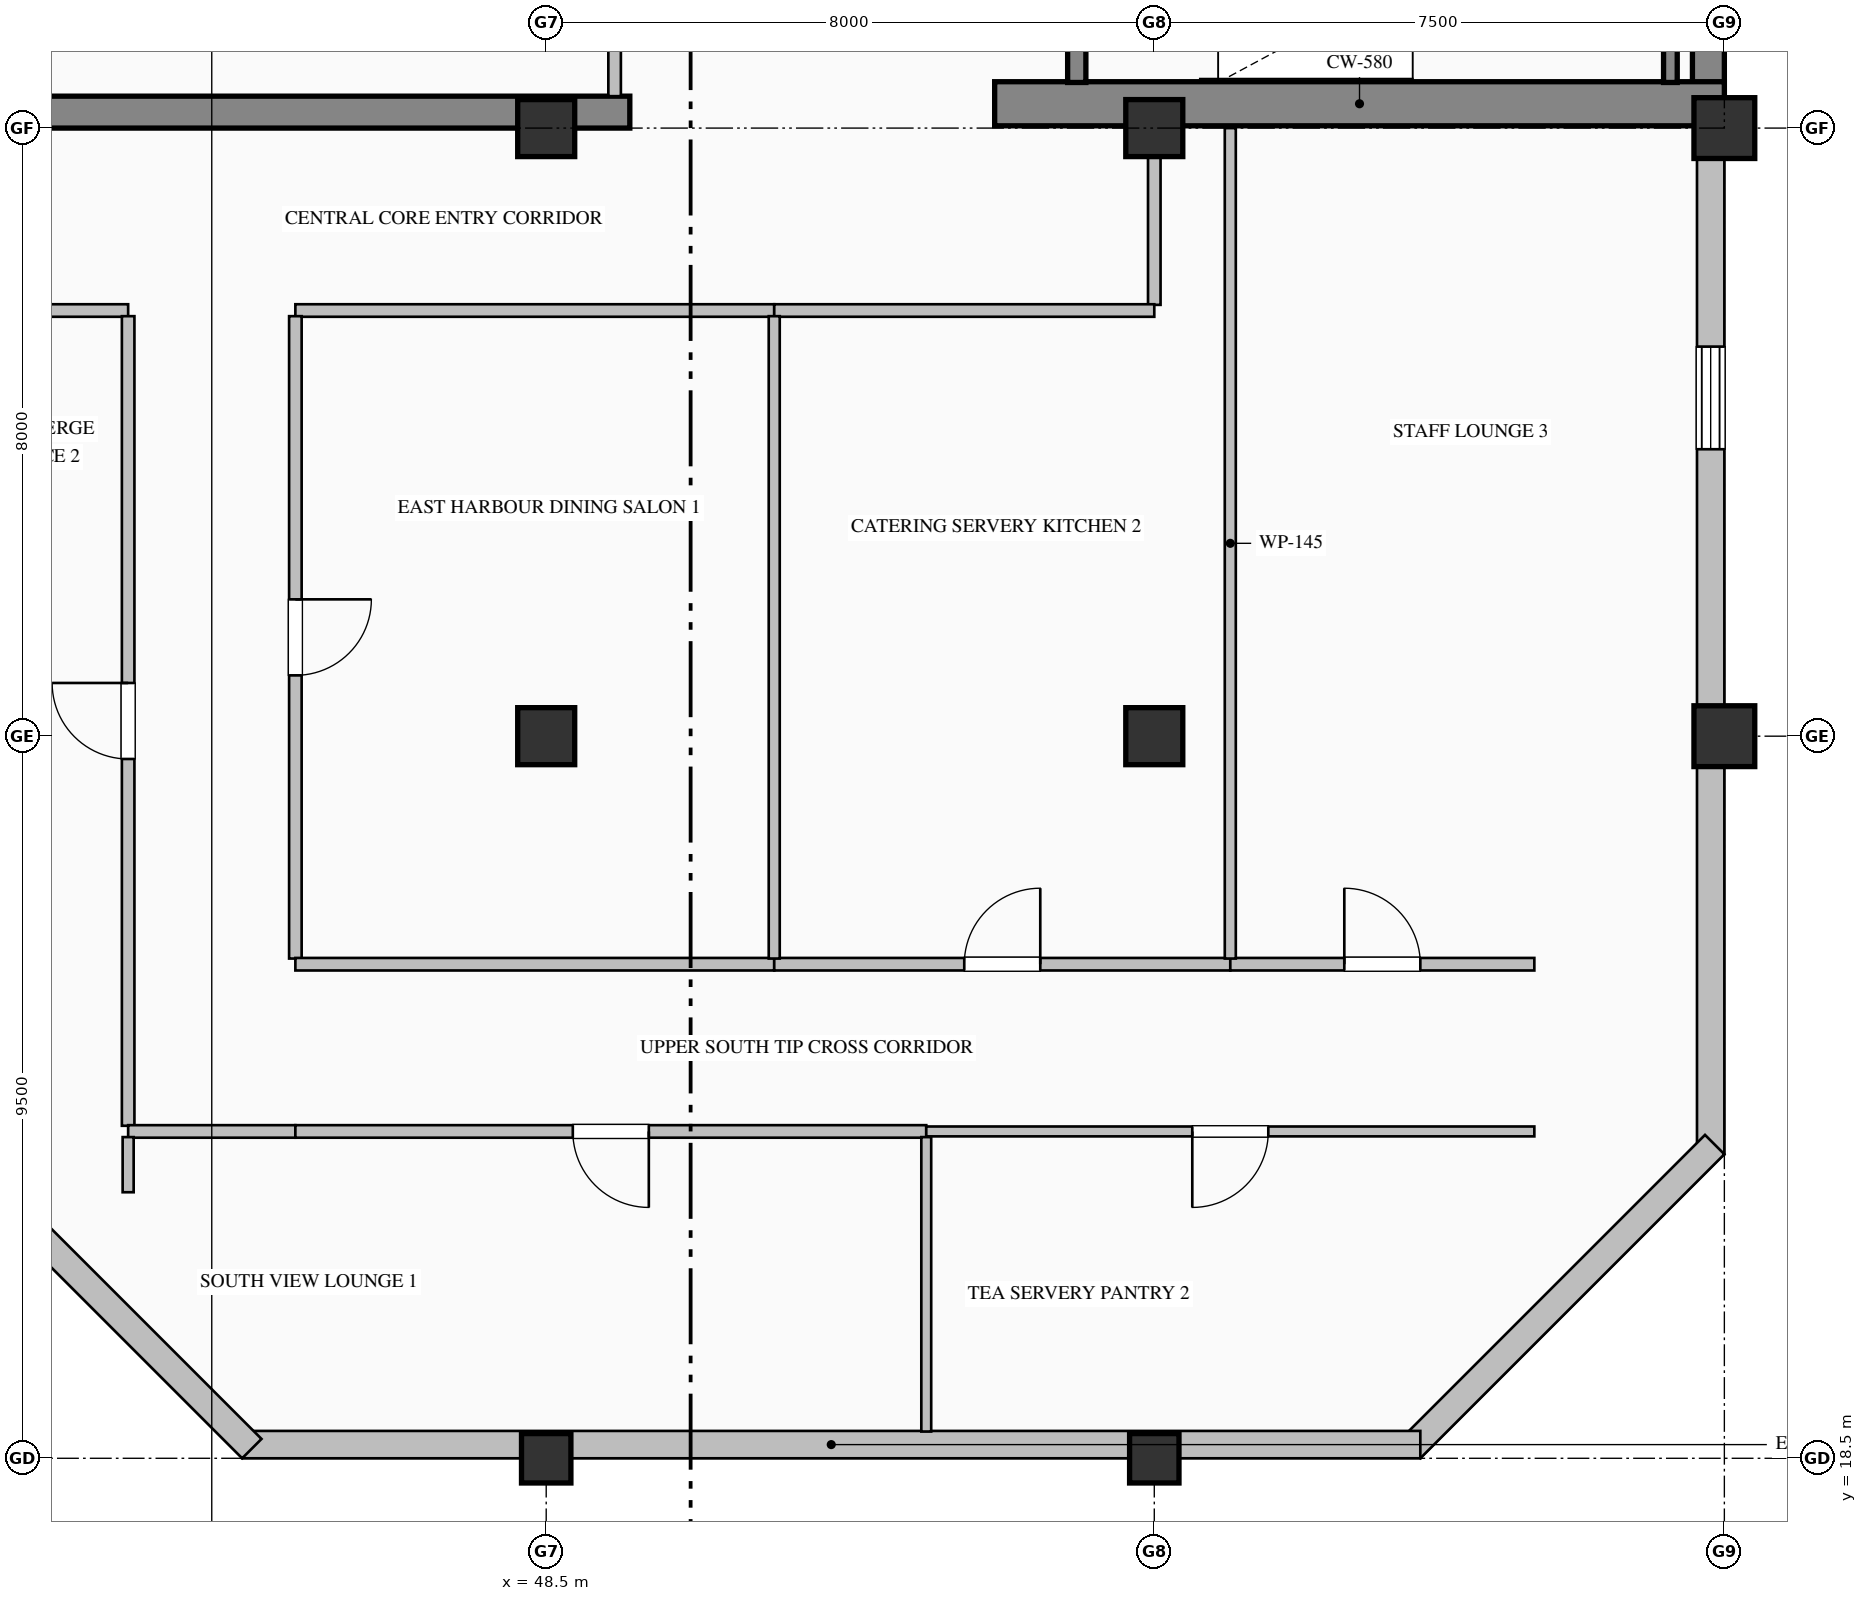
"""IFC4 building model, lengths in metres.
Left out: names, types, materials, properties, quantities, classifications, styles, units other than length and angle.
Written with IfcOpenShell. Run it as: python <this file> out.ifc"""

import sys

from ifc_helpers import new_model, si_unit, direction, frame, frame_2d, origin, origin_2d, place, context, subcontext, project, spatial, rectangle, hollow_rectangle, extrude, element, fill, save


model = new_model("IFC4")
c1 = context("Model", 3, precision=1e-05, world=origin(), true_north=direction((0.0, 1.0)))
c2 = subcontext(c1, "Body", "Model", "MODEL_VIEW")
j1 = project(units=[si_unit("LENGTHUNIT", "METRE"), si_unit("PLANEANGLEUNIT", "RADIAN")], contexts=[c1])
p1 = place(None, origin())
s1 = spatial("IfcSite", under=j1, at=p1, CompositionType="ELEMENT")
p2 = place(p1, origin())
s2 = spatial("IfcBuilding", under=s1, at=p2, CompositionType="ELEMENT")
p3 = place(p2, frame((0.0, 0.0, 331.2)))
s3 = spatial("IfcBuildingStorey", under=s2, at=p3, CompositionType="ELEMENT", Elevation=331.2)
p4 = place(p3, frame((63.79, 36.32, 0.0), z_axis=(0.0, 0.0, 1.0), x_axis=(0.0, 1.0, 0.0)))
e1 = element("IfcWall", 1, at=p4, inside=s3, PredefinedType="SHEAR", context=c2, shape_type="SweptSolid", body=[
    extrude(rectangle(XDim=15.26, YDim=0.42, at=frame_2d((7.63, 0.0))), origin(), (0.0, 0.0, 1.0), 3.785),
])
p5 = place(p3, frame((40.5, 36.21, 0.0), z_axis=(0.0, 0.0, 1.0), x_axis=(1.0, 0.0, 0.0)))
e2 = element("IfcWall", 2, at=p5, inside=s3, PredefinedType="SHEAR", context=c2, shape_type="SweptSolid", body=[
    extrude(rectangle(XDim=9.1, YDim=0.42, at=frame_2d((4.55, 0.0))), origin(), (0.0, 0.0, 1.0), 3.785),
])
p6 = place(p3, frame((54.4, 36.32, 0.0), z_axis=(0.0, 0.0, 1.0), x_axis=(1.0, 0.0, 0.0)))
e3 = element("IfcWall", 3, at=p6, inside=s3, PredefinedType="SHEAR", context=c2, shape_type="SweptSolid", body=[
    extrude(rectangle(XDim=9.6, YDim=0.58, at=frame_2d((4.8, 0.0))), origin(), (0.0, 0.0, 1.0), 4.0),
])
p7 = place(p3, frame((48.5, 18.5, 0.0), z_axis=(0.0, 0.0, 1.0), x_axis=(1.0, 0.0, 0.0)))
e4 = element("IfcColumn", 4, at=p7, inside=s3, PredefinedType="COLUMN", context=c2, shape_type="SweptSolid", body=[
    extrude(hollow_rectangle(XDim=0.65, YDim=0.65, WallThickness=0.028, at=origin_2d()), origin(), (0.0, 0.0, 1.0), 4.0),
])
for number, where, z_axis, x_axis in (
    (5, (48.5, 28.0, 0.0), (0.0, 0.0, 1.0), (1.0, 0.0, 0.0)),
    (6, (48.5, 36.0, 0.0), (0.0, 0.0, 1.0), (1.0, 0.0, 0.0)),
):
    element("IfcColumn", number, at=place(p3, frame(where, z_axis=z_axis, x_axis=x_axis)), inside=s3, PredefinedType="COLUMN", context=c2, shape_type="SweptSolid", body=[
        extrude(rectangle(XDim=0.75, YDim=0.75, at=origin_2d()), origin(), (0.0, 0.0, 1.0), 4.0),
    ])
p8 = place(p3, frame((56.5, 18.5, 0.0), z_axis=(0.0, 0.0, 1.0), x_axis=(1.0, 0.0, 0.0)))
e7 = element("IfcColumn", 7, at=p8, inside=s3, PredefinedType="COLUMN", context=c2, shape_type="SweptSolid", body=[
    extrude(hollow_rectangle(XDim=0.65, YDim=0.65, WallThickness=0.028, at=origin_2d()), origin(), (0.0, 0.0, 1.0), 4.0),
])
for number, where, z_axis, x_axis in (
    (8, (56.5, 28.0, 0.0), (0.0, 0.0, 1.0), (1.0, 0.0, 0.0)),
    (9, (56.5, 36.0, 0.0), (0.0, 0.0, 1.0), (1.0, 0.0, 0.0)),
):
    element("IfcColumn", number, at=place(p3, frame(where, z_axis=z_axis, x_axis=x_axis)), inside=s3, PredefinedType="COLUMN", context=c2, shape_type="SweptSolid", body=[
        extrude(rectangle(XDim=0.75, YDim=0.75, at=origin_2d()), origin(), (0.0, 0.0, 1.0), 4.0),
    ])
for number, where, z_axis, x_axis in (
    (10, (64.0, 28.0, 0.0), (0.0, 0.0, 1.0), (1.0, 0.0, 0.0)),
    (11, (64.0, 36.0, 0.0), (0.0, 0.0, 1.0), (1.0, 0.0, 0.0)),
):
    element("IfcColumn", number, at=place(p3, frame(where, z_axis=z_axis, x_axis=x_axis)), inside=s3, PredefinedType="COLUMN", context=c2, shape_type="SweptSolid", body=[
        extrude(hollow_rectangle(XDim=0.8, YDim=0.8, WallThickness=0.032, at=origin_2d()), origin(), (0.0, 0.0, 1.0), 4.0),
    ])
p9 = place(p3, frame((63.82, 36.05, 0.0), z_axis=(0.0, 0.0, 1.0), x_axis=(0.0, -1.0, 0.0)))
e12 = element("IfcWall", 12, at=p9, inside=s3, PredefinedType="SOLIDWALL", context=c2, shape_type="SweptSolid", body=[
    extrude(rectangle(XDim=13.55, YDim=0.36, at=frame_2d((6.775, 0.0))), origin(), (0.0, 0.0, 1.0), 3.335),
])
p10 = place(p9, frame((2.925, 0.0, 0.9)))
e13 = element("IfcOpeningElement", 13, at=p10, cuts=e12, PredefinedType="OPENING", context=c2, shape_type="SweptSolid", body=[
    extrude(rectangle(XDim=1.35, YDim=1.85, at=frame_2d((0.675, 0.925))), frame((0.0, 0.19, 0.0), z_axis=(0.0, -1.0, 0.0), x_axis=(1.0, 0.0, 0.0)), (0.0, 0.0, 1.0), 0.38),
])
p11 = place(p3, frame((63.873, 22.627, 0.0), z_axis=(0.0, 0.0, 1.0), x_axis=(-0.707106781187, -0.707106781187, 0.0)))
e14 = element("IfcWall", 14, at=p11, inside=s3, PredefinedType="SOLIDWALL", context=c2, shape_type="SweptSolid", body=[
    extrude(rectangle(XDim=5.657, YDim=0.36, at=frame_2d((2.828, 0.0))), origin(), (0.0, 0.0, 1.0), 3.785),
])
p12 = place(p3, frame((60.0, 18.68, 0.0), z_axis=(0.0, 0.0, 1.0), x_axis=(-1.0, 0.0, 0.0)))
e15 = element("IfcWall", 15, at=p12, inside=s3, PredefinedType="SOLIDWALL", context=c2, shape_type="SweptSolid", body=[
    extrude(rectangle(XDim=15.5, YDim=0.36, at=frame_2d((7.75, 0.0))), origin(), (0.0, 0.0, 1.0), 3.335),
])
p13 = place(p3, frame((44.627, 18.627, 0.0), z_axis=(0.0, 0.0, 1.0), x_axis=(-0.707106781187, 0.707106781187, 0.0)))
e16 = element("IfcWall", 16, at=p13, inside=s3, PredefinedType="SOLIDWALL", context=c2, shape_type="SweptSolid", body=[
    extrude(rectangle(XDim=5.657, YDim=0.36, at=frame_2d((2.828, 0.0))), origin(), (0.0, 0.0, 1.0), 3.785),
])
p14 = place(p3, frame((55.48, 39.75, 0.0), z_axis=(0.0, 0.0, 1.0), x_axis=(0.0, -1.0, 0.0)))
e17 = element("IfcWall", 17, at=p14, inside=s3, PredefinedType="SOLIDWALL", context=c2, shape_type="SweptSolid", body=[
    extrude(rectangle(XDim=3.15, YDim=0.24, at=frame_2d((1.575, 0.0))), origin(), (0.0, 0.0, 1.0), 4.0),
])
p15 = place(p14, frame((1.0, 0.0, 0.0)))
e18 = element("IfcOpeningElement", 18, at=p15, cuts=e17, PredefinedType="OPENING", context=c2, shape_type="SweptSolid", body=[
    extrude(rectangle(XDim=1.15, YDim=2.2, at=frame_2d((0.575, 1.1))), frame((0.0, 0.13, 0.0), z_axis=(0.0, -1.0, 0.0), x_axis=(1.0, 0.0, 0.0)), (0.0, 0.0, 1.0), 0.26),
])
p16 = place(p3, frame((63.29, 36.6, 0.0), z_axis=(0.0, 0.0, 1.0), x_axis=(0.0, 1.0, 0.0)))
e19 = element("IfcWall", 19, at=p16, inside=s3, PredefinedType="SOLIDWALL", context=c2, shape_type="SweptSolid", body=[
    extrude(rectangle(XDim=3.15, YDim=0.18, at=frame_2d((1.575, 0.0))), origin(), (0.0, 0.0, 1.0), 4.0),
])
p17 = place(p3, frame((49.4, 36.42, 0.0), z_axis=(0.0, 0.0, 1.0), x_axis=(0.0, 1.0, 0.0)))
e20 = element("IfcWall", 20, at=p17, inside=s3, PredefinedType="PARTITIONING", context=c2, shape_type="SweptSolid", body=[
    extrude(rectangle(XDim=3.115, YDim=0.165, at=frame_2d((1.558, 0.0))), origin(), (0.0, 0.0, 1.0), 3.027),
])
p18 = place(p17, frame((1.058, 0.0, 0.0)))
e21 = element("IfcOpeningElement", 21, at=p18, cuts=e20, PredefinedType="OPENING", context=c2, shape_type="SweptSolid", body=[
    extrude(rectangle(XDim=1.0, YDim=2.15, at=frame_2d((0.5, 1.075))), frame((0.0, 0.093, 0.0), z_axis=(0.0, -1.0, 0.0), x_axis=(1.0, 0.0, 0.0)), (0.0, 0.0, 1.0), 0.185),
])
p19 = place(p3, frame((51.5, 33.6, 0.0), z_axis=(0.0, 0.0, 1.0), x_axis=(-1.0, 0.0, 0.0)))
e22 = element("IfcWall", 22, at=p19, inside=s3, PredefinedType="PARTITIONING", context=c2, shape_type="SweptSolid", body=[
    extrude(rectangle(XDim=6.3, YDim=0.165, at=frame_2d((3.15, 0.0))), origin(), (0.0, 0.0, 1.0), 3.785),
])
p20 = place(p3, frame((56.5, 36.0, 0.0), z_axis=(0.0, 0.0, 1.0), x_axis=(0.0, -1.0, 0.0)))
e23 = element("IfcWall", 23, at=p20, inside=s3, PredefinedType="PARTITIONING", context=c2, shape_type="SweptSolid", body=[
    extrude(rectangle(XDim=2.325, YDim=0.165, at=frame_2d((1.163, 0.0))), origin(), (0.0, 0.0, 1.0), 3.177),
])
p21 = place(p3, frame((56.5, 33.6, 0.0), z_axis=(0.0, 0.0, 1.0), x_axis=(-1.0, 0.0, 0.0)))
e24 = element("IfcWall", 24, at=p21, inside=s3, PredefinedType="PARTITIONING", context=c2, shape_type="SweptSolid", body=[
    extrude(rectangle(XDim=5.0, YDim=0.165, at=frame_2d((2.5, 0.0))), origin(), (0.0, 0.0, 1.0), 3.785),
])
p22 = place(p3, frame((43.0, 33.6, 0.0), z_axis=(0.0, 0.0, 1.0), x_axis=(-1.0, 0.0, 0.0)))
e25 = element("IfcWall", 25, at=p22, inside=s3, PredefinedType="PARTITIONING", context=c2, shape_type="SweptSolid", body=[
    extrude(rectangle(XDim=2.5, YDim=0.165, at=frame_2d((1.25, 0.0))), origin(), (0.0, 0.0, 1.0), 3.785),
])
p23 = place(p3, frame((45.2, 33.525, 0.0), z_axis=(0.0, 0.0, 1.0), x_axis=(0.0, -1.0, 0.0)))
e26 = element("IfcWall", 26, at=p23, inside=s3, PredefinedType="PARTITIONING", context=c2, shape_type="SweptSolid", body=[
    extrude(rectangle(XDim=8.451, YDim=0.165, at=frame_2d((4.226, 0.0))), origin(), (0.0, 0.0, 1.0), 3.785),
])
p24 = place(p23, frame((3.726, 0.0, 0.0)))
e27 = element("IfcOpeningElement", 27, at=p24, cuts=e26, PredefinedType="OPENING", context=c2, shape_type="SweptSolid", body=[
    extrude(rectangle(XDim=1.0, YDim=2.15, at=frame_2d((0.5, 1.075))), frame((0.0, 0.093, 0.0), z_axis=(0.0, -1.0, 0.0), x_axis=(1.0, 0.0, 0.0)), (0.0, 0.0, 1.0), 0.185),
])
p25 = place(p3, frame((43.0, 22.875, 0.0), z_axis=(0.0, 0.0, 1.0), x_axis=(0.0, 1.0, 0.0)))
e28 = element("IfcWall", 28, at=p25, inside=s3, PredefinedType="PARTITIONING", context=c2, shape_type="SweptSolid", body=[
    extrude(rectangle(XDim=10.651, YDim=0.165, at=frame_2d((5.325, 0.0))), origin(), (0.0, 0.0, 1.0), 3.785),
])
p26 = place(p25, frame((4.825, 0.0, 0.0)))
e29 = element("IfcOpeningElement", 29, at=p26, cuts=e28, PredefinedType="OPENING", context=c2, shape_type="SweptSolid", body=[
    extrude(rectangle(XDim=1.0, YDim=2.15, at=frame_2d((0.5, 1.075))), frame((0.0, 0.093, 0.0), z_axis=(0.0, -1.0, 0.0), x_axis=(1.0, 0.0, 0.0)), (0.0, 0.0, 1.0), 0.185),
])
p27 = place(p3, frame((45.2, 22.8, 0.0), z_axis=(0.0, 0.0, 1.0), x_axis=(-1.0, 0.0, 0.0)))
e30 = element("IfcWall", 30, at=p27, inside=s3, PredefinedType="PARTITIONING", context=c2, shape_type="SweptSolid", body=[
    extrude(rectangle(XDim=2.2, YDim=0.165, at=frame_2d((1.1, 0.0))), origin(), (0.0, 0.0, 1.0), 3.785),
])
p28 = place(p3, frame((45.2, 25.0, 0.0), z_axis=(0.0, 0.0, 1.0), x_axis=(1.0, 0.0, 0.0)))
e31 = element("IfcWall", 31, at=p28, inside=s3, PredefinedType="PARTITIONING", context=c2, shape_type="SweptSolid", body=[
    extrude(rectangle(XDim=6.3, YDim=0.165, at=frame_2d((3.15, 0.0))), origin(), (0.0, 0.0, 1.0), 3.785),
])
p29 = place(p3, frame((51.5, 25.0, 0.0), z_axis=(0.0, 0.0, 1.0), x_axis=(1.0, 0.0, 0.0)))
e32 = element("IfcWall", 32, at=p29, inside=s3, PredefinedType="PARTITIONING", context=c2, shape_type="SweptSolid", body=[
    extrude(rectangle(XDim=6.0, YDim=0.165, at=frame_2d((3.0, 0.0))), origin(), (0.0, 0.0, 1.0), 3.785),
])
p30 = place(p29, frame((2.5, 0.0, 0.0)))
e33 = element("IfcOpeningElement", 33, at=p30, cuts=e32, PredefinedType="OPENING", context=c2, shape_type="SweptSolid", body=[
    extrude(rectangle(XDim=1.0, YDim=2.15, at=frame_2d((0.5, 1.075))), frame((0.0, 0.093, 0.0), z_axis=(0.0, -1.0, 0.0), x_axis=(1.0, 0.0, 0.0)), (0.0, 0.0, 1.0), 0.185),
])
p31 = place(p3, frame((57.5, 25.0, 0.0), z_axis=(0.0, 0.0, 1.0), x_axis=(1.0, 0.0, 0.0)))
e34 = element("IfcWall", 34, at=p31, inside=s3, PredefinedType="PARTITIONING", context=c2, shape_type="SweptSolid", body=[
    extrude(rectangle(XDim=4.0, YDim=0.165, at=frame_2d((2.0, 0.0))), origin(), (0.0, 0.0, 1.0), 3.785),
])
p32 = place(p31, frame((1.5, 0.0, 0.0)))
e35 = element("IfcOpeningElement", 35, at=p32, cuts=e34, PredefinedType="OPENING", context=c2, shape_type="SweptSolid", body=[
    extrude(rectangle(XDim=1.0, YDim=2.15, at=frame_2d((0.5, 1.075))), frame((0.0, 0.093, 0.0), z_axis=(0.0, -1.0, 0.0), x_axis=(1.0, 0.0, 0.0)), (0.0, 0.0, 1.0), 0.185),
])
p33 = place(p3, frame((53.5, 22.8, 0.0), z_axis=(0.0, 0.0, 1.0), x_axis=(-1.0, 0.0, 0.0)))
e36 = element("IfcWall", 36, at=p33, inside=s3, PredefinedType="PARTITIONING", context=c2, shape_type="SweptSolid", body=[
    extrude(rectangle(XDim=8.3, YDim=0.165, at=frame_2d((4.15, 0.0))), origin(), (0.0, 0.0, 1.0), 3.785),
])
p34 = place(p33, frame((3.65, 0.0, 0.0)))
e37 = element("IfcOpeningElement", 37, at=p34, cuts=e36, PredefinedType="OPENING", context=c2, shape_type="SweptSolid", body=[
    extrude(rectangle(XDim=1.0, YDim=2.15, at=frame_2d((0.5, 1.075))), frame((0.0, 0.093, 0.0), z_axis=(0.0, -1.0, 0.0), x_axis=(1.0, 0.0, 0.0)), (0.0, 0.0, 1.0), 0.185),
])
p35 = place(p3, frame((61.5, 22.8, 0.0), z_axis=(0.0, 0.0, 1.0), x_axis=(-1.0, 0.0, 0.0)))
e38 = element("IfcWall", 38, at=p35, inside=s3, PredefinedType="PARTITIONING", context=c2, shape_type="SweptSolid", body=[
    extrude(rectangle(XDim=8.0, YDim=0.13, at=frame_2d((4.0, 0.0))), origin(), (0.0, 0.0, 1.0), 3.785),
])
p36 = place(p35, frame((3.5, 0.0, 0.0)))
e39 = element("IfcOpeningElement", 39, at=p36, cuts=e38, PredefinedType="OPENING", context=c2, shape_type="SweptSolid", body=[
    extrude(rectangle(XDim=1.0, YDim=2.15, at=frame_2d((0.5, 1.075))), frame((0.0, 0.075, 0.0), z_axis=(0.0, -1.0, 0.0), x_axis=(1.0, 0.0, 0.0)), (0.0, 0.0, 1.0), 0.15),
])
p37 = place(p3, frame((51.5, 33.525, 0.0), z_axis=(0.0, 0.0, 1.0), x_axis=(0.0, -1.0, 0.0)))
e40 = element("IfcWall", 40, at=p37, inside=s3, PredefinedType="PARTITIONING", context=c2, shape_type="SweptSolid", body=[
    extrude(rectangle(XDim=8.451, YDim=0.145, at=frame_2d((4.226, 0.0))), origin(), (0.0, 0.0, 1.0), 3.785),
])
p38 = place(p3, frame((57.5, 36.0, 0.0), z_axis=(0.0, 0.0, 1.0), x_axis=(0.0, -1.0, 0.0)))
e41 = element("IfcWall", 41, at=p38, inside=s3, PredefinedType="PARTITIONING", context=c2, shape_type="SweptSolid", body=[
    extrude(rectangle(XDim=10.926, YDim=0.145, at=frame_2d((5.463, 0.0))), origin(), (0.0, 0.0, 1.0), 3.785),
])
p39 = place(p3, frame((43.0, 22.726, 0.0), z_axis=(0.0, 0.0, 1.0), x_axis=(0.0, -1.0, 0.0)))
e42 = element("IfcWall", 42, at=p39, inside=s3, PredefinedType="PARTITIONING", context=c2, shape_type="SweptSolid", body=[
    extrude(rectangle(XDim=0.726, YDim=0.145, at=frame_2d((0.363, 0.0))), origin(), (0.0, 0.0, 1.0), 3.785),
])
p40 = place(p3, frame((53.5, 22.726, 0.0), z_axis=(0.0, 0.0, 1.0), x_axis=(0.0, -1.0, 0.0)))
e43 = element("IfcWall", 43, at=p40, inside=s3, PredefinedType="PARTITIONING", context=c2, shape_type="SweptSolid", body=[
    extrude(rectangle(XDim=3.874, YDim=0.13, at=frame_2d((1.937, 0.0))), origin(), (0.0, 0.0, 1.0), 3.785),
])
p41 = place(p10, origin())
e44 = element("IfcWindow", 44, at=p41, inside=s3, PartitioningType="DOUBLE_PANEL_VERTICAL", PredefinedType="WINDOW", context=c2, shape_type="SweptSolid", body=[
    extrude(rectangle(XDim=1.35, YDim=1.85, at=frame_2d((0.675, 0.925))), frame((0.0, 0.15, 0.0), z_axis=(0.0, -1.0, 0.0), x_axis=(1.0, 0.0, 0.0)), (0.0, 0.0, 1.0), 0.06),
])
fill(e13, e44)
p42 = place(p24, origin())
e45 = element("IfcDoor", 45, at=p42, inside=s3, OperationType="SINGLE_SWING_LEFT", PredefinedType="DOOR", context=c2, shape_type="SweptSolid", body=[
    extrude(rectangle(XDim=1.0, YDim=2.15, at=frame_2d((0.5, 1.075))), frame((0.0, 0.025, 0.0), z_axis=(0.0, -1.0, 0.0), x_axis=(1.0, 0.0, 0.0)), (0.0, 0.0, 1.0), 0.05),
])
fill(e27, e45)
p43 = place(p30, origin())
e46 = element("IfcDoor", 46, at=p43, inside=s3, OperationType="SINGLE_SWING_RIGHT", PredefinedType="DOOR", context=c2, shape_type="SweptSolid", body=[
    extrude(rectangle(XDim=1.0, YDim=2.15, at=frame_2d((0.5, 1.075))), frame((0.0, 0.025, 0.0), z_axis=(0.0, -1.0, 0.0), x_axis=(1.0, 0.0, 0.0)), (0.0, 0.0, 1.0), 0.05),
])
fill(e33, e46)
p44 = place(p32, origin())
e47 = element("IfcDoor", 47, at=p44, inside=s3, OperationType="SINGLE_SWING_LEFT", PredefinedType="DOOR", context=c2, shape_type="SweptSolid", body=[
    extrude(rectangle(XDim=1.0, YDim=2.15, at=frame_2d((0.5, 1.075))), frame((0.0, 0.025, 0.0), z_axis=(0.0, -1.0, 0.0), x_axis=(1.0, 0.0, 0.0)), (0.0, 0.0, 1.0), 0.05),
])
fill(e35, e47)
p45 = place(p26, origin())
e48 = element("IfcDoor", 48, at=p45, inside=s3, OperationType="SINGLE_SWING_RIGHT", PredefinedType="DOOR", context=c2, shape_type="SweptSolid", body=[
    extrude(rectangle(XDim=1.0, YDim=2.15, at=frame_2d((0.5, 1.075))), frame((0.0, 0.025, 0.0), z_axis=(0.0, -1.0, 0.0), x_axis=(1.0, 0.0, 0.0)), (0.0, 0.0, 1.0), 0.05),
])
fill(e29, e48)
p46 = place(p34, origin())
e49 = element("IfcDoor", 49, at=p46, inside=s3, OperationType="SINGLE_SWING_LEFT", PredefinedType="DOOR", context=c2, shape_type="SweptSolid", body=[
    extrude(rectangle(XDim=1.0, YDim=2.15, at=frame_2d((0.5, 1.075))), frame((0.0, 0.025, 0.0), z_axis=(0.0, -1.0, 0.0), x_axis=(1.0, 0.0, 0.0)), (0.0, 0.0, 1.0), 0.05),
])
fill(e37, e49)
p47 = place(p36, origin())
e50 = element("IfcDoor", 50, at=p47, inside=s3, OperationType="SINGLE_SWING_RIGHT", PredefinedType="DOOR", context=c2, shape_type="SweptSolid", body=[
    extrude(rectangle(XDim=1.0, YDim=2.15, at=frame_2d((0.5, 1.075))), frame((0.0, 0.025, 0.0), z_axis=(0.0, -1.0, 0.0), x_axis=(1.0, 0.0, 0.0)), (0.0, 0.0, 1.0), 0.05),
])
fill(e39, e50)
save(model, sys.argv[1])
